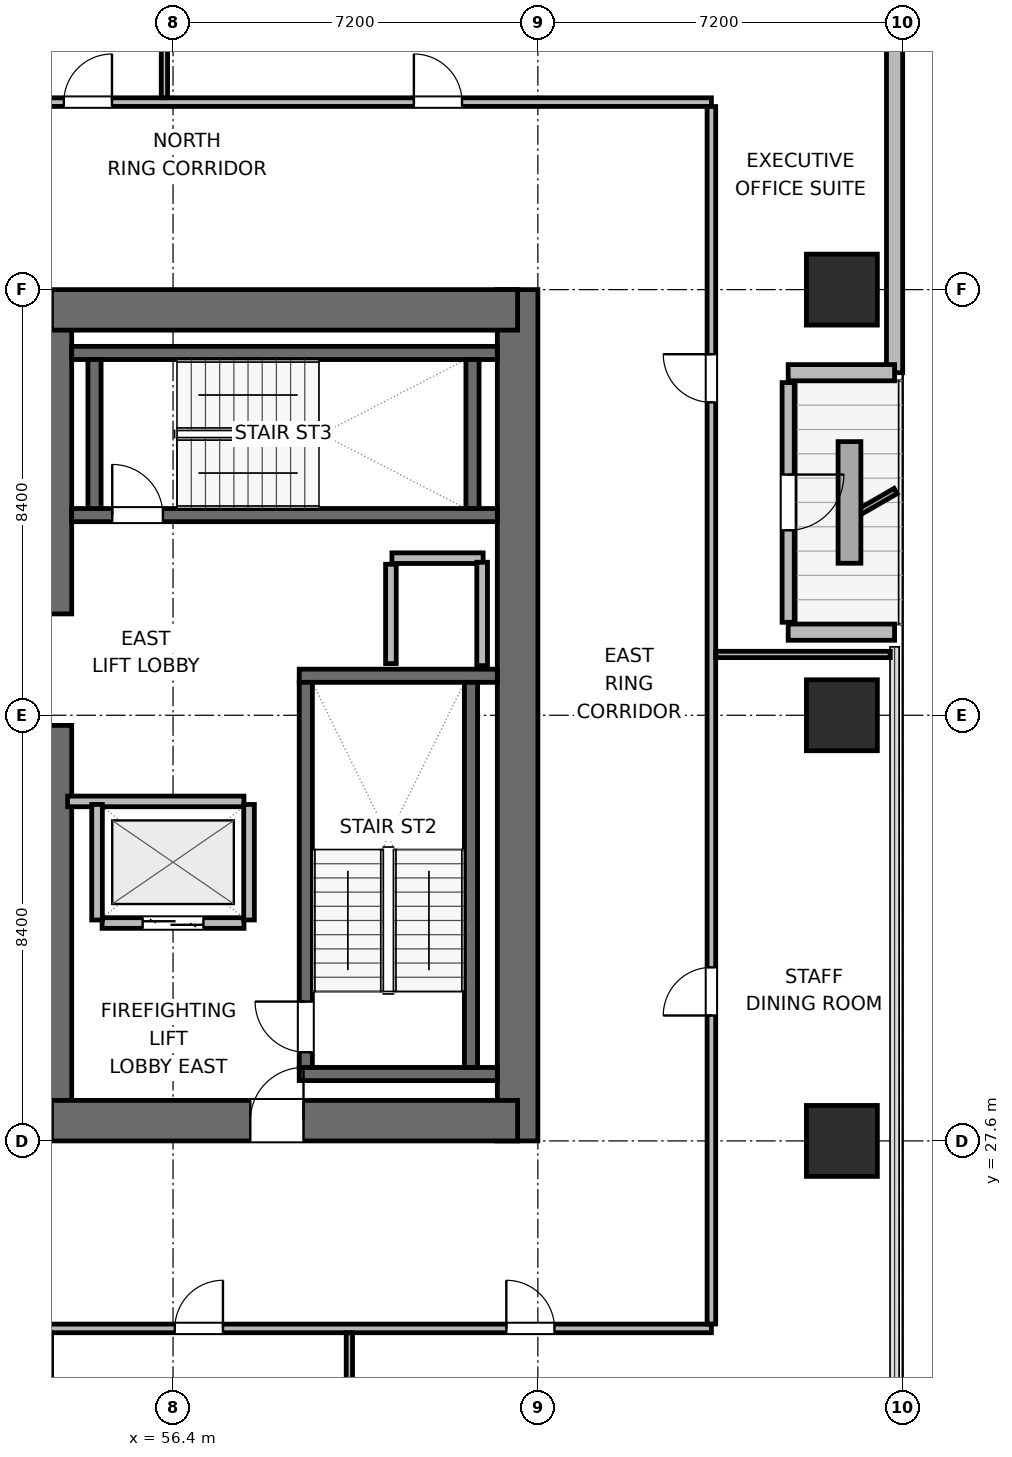
"""IFC4 building model, lengths in metres.
Left out: names, types, materials, properties, quantities, classifications, styles, units other than length and angle.
Written with IfcOpenShell. Run it as: python <this file> out.ifc"""

import sys

from ifc_helpers import new_model, si_unit, direction, frame, frame_2d, origin, origin_2d, place, context, subcontext, project, spatial, rectangle, extrude, element, fill, save


model = new_model("IFC4")
c1 = context("Model", 3, precision=1e-05, world=origin(), true_north=direction((0.0, 1.0)))
c2 = subcontext(c1, "Body", "Model", "MODEL_VIEW")
j1 = project(units=[si_unit("LENGTHUNIT", "METRE"), si_unit("PLANEANGLEUNIT", "RADIAN")], contexts=[c1])
p1 = place(None, origin())
s1 = spatial("IfcSite", under=j1, at=p1, CompositionType="ELEMENT")
p2 = place(p1, origin())
s2 = spatial("IfcBuilding", under=s1, at=p2, CompositionType="ELEMENT")
p3 = place(p2, frame((0.0, 0.0, 97.5)))
s3 = spatial("IfcBuildingStorey", under=s2, at=p3, CompositionType="ELEMENT", Elevation=97.5)
p4 = place(p3, frame((54.0, 28.0, 0.0), z_axis=(0.0, 0.0, 1.0), x_axis=(0.0, 1.0, 0.0)))
e1 = element("IfcWall", 1, at=p4, inside=s3, PredefinedType="SHEAR", context=c2, shape_type="SweptSolid", body=[
    extrude(rectangle(XDim=7.8, YDim=0.8, at=frame_2d((3.9, 0.0))), origin(), (0.0, 0.0, 1.0), 3.9),
])
p5 = place(p3, frame((54.0, 38.0, 0.0), z_axis=(0.0, 0.0, 1.0), x_axis=(0.0, 1.0, 0.0)))
e2 = element("IfcWall", 2, at=p5, inside=s3, PredefinedType="SHEAR", context=c2, shape_type="SweptSolid", body=[
    extrude(rectangle(XDim=6.0, YDim=0.8, at=frame_2d((3.0, 0.0))), origin(), (0.0, 0.0, 1.0), 3.9),
])
p6 = place(p3, frame((63.2, 27.6, 0.0), z_axis=(0.0, 0.0, 1.0), x_axis=(0.0, 1.0, 0.0)))
e3 = element("IfcWall", 3, at=p6, inside=s3, PredefinedType="SHEAR", context=c2, shape_type="SweptSolid", body=[
    extrude(rectangle(XDim=16.8, YDim=0.8, at=frame_2d((8.4, 0.0))), origin(), (0.0, 0.0, 1.0), 3.9),
])
p7 = place(p3, frame((54.0, 28.0, 0.0), z_axis=(0.0, 0.0, 1.0), x_axis=(1.0, 0.0, 0.0)))
e4 = element("IfcWall", 4, at=p7, inside=s3, PredefinedType="SHEAR", context=c2, shape_type="SweptSolid", body=[
    extrude(rectangle(XDim=9.2, YDim=0.8, at=frame_2d((4.6, 0.0))), origin(), (0.0, 0.0, 1.0), 3.9),
])
p8 = place(p7, frame((3.925, 0.0, 0.0)))
e5 = element("IfcOpeningElement", 5, at=p8, cuts=e4, PredefinedType="OPENING", context=c2, shape_type="SweptSolid", body=[
    extrude(rectangle(XDim=1.05, YDim=2.04, at=frame_2d((0.525, 1.02))), frame((0.0, 0.41, 0.0), z_axis=(0.0, -1.0, 0.0), x_axis=(1.0, 0.0, 0.0)), (0.0, 0.0, 1.0), 0.82),
])
p9 = place(p3, frame((54.0, 44.0, 0.0), z_axis=(0.0, 0.0, 1.0), x_axis=(1.0, 0.0, 0.0)))
e6 = element("IfcWall", 6, at=p9, inside=s3, PredefinedType="SHEAR", context=c2, shape_type="SweptSolid", body=[
    extrude(rectangle(XDim=9.2, YDim=0.8, at=frame_2d((4.6, 0.0))), origin(), (0.0, 0.0, 1.0), 3.9),
])
for number, where, z_axis, x_axis in (
    (7, (58.89, 28.92, 0.0), (0.0, 0.0, 1.0), (1.0, 0.0, 0.0)),
    (8, (58.89, 36.78, 0.0), (0.0, 0.0, 1.0), (1.0, 0.0, 0.0)),
):
    element("IfcWall", number, at=place(p3, frame(where, z_axis=z_axis, x_axis=x_axis)), inside=s3, PredefinedType="SHEAR", context=c2, shape_type="SweptSolid", body=[
        extrude(rectangle(XDim=3.91, YDim=0.26, at=frame_2d((1.955, 0.0))), origin(), (0.0, 0.0, 1.0), 3.9),
    ])
p10 = place(p3, frame((59.02, 29.05, 0.0), z_axis=(0.0, 0.0, 1.0), x_axis=(0.0, 1.0, 0.0)))
e9 = element("IfcWall", 9, at=p10, inside=s3, PredefinedType="SHEAR", context=c2, shape_type="SweptSolid", body=[
    extrude(rectangle(XDim=7.6, YDim=0.26, at=frame_2d((3.8, 0.0))), origin(), (0.0, 0.0, 1.0), 3.9),
])
p11 = place(p10, frame((0.3, 0.0, 0.0)))
e10 = element("IfcOpeningElement", 10, at=p11, cuts=e9, PredefinedType="OPENING", context=c2, shape_type="SweptSolid", body=[
    extrude(rectangle(XDim=1.0, YDim=2.04, at=frame_2d((0.5, 1.02))), frame((0.0, 0.14, 0.0), z_axis=(0.0, -1.0, 0.0), x_axis=(1.0, 0.0, 0.0)), (0.0, 0.0, 1.0), 0.28),
])
p12 = place(p3, frame((62.28, 29.05, 0.0), z_axis=(0.0, 0.0, 1.0), x_axis=(0.0, 1.0, 0.0)))
e11 = element("IfcWall", 11, at=p12, inside=s3, PredefinedType="SHEAR", context=c2, shape_type="SweptSolid", body=[
    extrude(rectangle(XDim=7.6, YDim=0.26, at=frame_2d((3.8, 0.0))), origin(), (0.0, 0.0, 1.0), 3.9),
])
p13 = place(p3, frame((54.4, 39.95, 0.0), z_axis=(0.0, 0.0, 1.0), x_axis=(1.0, 0.0, 0.0)))
e12 = element("IfcWall", 12, at=p13, inside=s3, PredefinedType="SHEAR", context=c2, shape_type="SweptSolid", body=[
    extrude(rectangle(XDim=8.4, YDim=0.26, at=frame_2d((4.2, 0.0))), origin(), (0.0, 0.0, 1.0), 3.9),
])
p14 = place(p13, frame((0.8, 0.0, 0.0)))
e13 = element("IfcOpeningElement", 13, at=p14, cuts=e12, PredefinedType="OPENING", context=c2, shape_type="SweptSolid", body=[
    extrude(rectangle(XDim=1.0, YDim=2.04, at=frame_2d((0.5, 1.02))), frame((0.0, 0.14, 0.0), z_axis=(0.0, -1.0, 0.0), x_axis=(1.0, 0.0, 0.0)), (0.0, 0.0, 1.0), 0.28),
])
p15 = place(p3, frame((54.4, 43.15, 0.0), z_axis=(0.0, 0.0, 1.0), x_axis=(1.0, 0.0, 0.0)))
e14 = element("IfcWall", 14, at=p15, inside=s3, PredefinedType="SHEAR", context=c2, shape_type="SweptSolid", body=[
    extrude(rectangle(XDim=8.4, YDim=0.26, at=frame_2d((4.2, 0.0))), origin(), (0.0, 0.0, 1.0), 3.9),
])
for number, where, z_axis, x_axis in (
    (15, (54.85, 40.08, 0.0), (0.0, 0.0, 1.0), (0.0, 1.0, 0.0)),
    (16, (62.31, 40.08, 0.0), (0.0, 0.0, 1.0), (0.0, 1.0, 0.0)),
):
    element("IfcWall", number, at=place(p3, frame(where, z_axis=z_axis, x_axis=x_axis)), inside=s3, PredefinedType="SHEAR", context=c2, shape_type="SweptSolid", body=[
        extrude(rectangle(XDim=2.94, YDim=0.26, at=frame_2d((1.47, 0.0))), origin(), (0.0, 0.0, 1.0), 3.9),
    ])
for number, where, z_axis, x_axis in (
    (17, (69.6, 27.6, 0.0), (0.0, 0.0, 1.0), (1.0, 0.0, 0.0)),
    (18, (69.6, 36.0, 0.0), (0.0, 0.0, 1.0), (1.0, 0.0, 0.0)),
    (19, (69.6, 44.4, 0.0), (0.0, 0.0, 1.0), (1.0, 0.0, 0.0)),
):
    element("IfcColumn", number, at=place(p3, frame(where, z_axis=z_axis, x_axis=x_axis)), inside=s3, PredefinedType="COLUMN", context=c2, shape_type="SweptSolid", body=[
        extrude(rectangle(XDim=1.4, YDim=1.4, at=origin_2d()), origin(), (0.0, 0.0, 1.0), 3.9),
    ])
p16 = place(p3, frame((70.64, 56.979, 0.0), z_axis=(0.0, 0.0, 1.0), x_axis=(0.0, -1.0, 0.0)))
e20 = element("IfcWall", 20, at=p16, inside=s3, PredefinedType="SOLIDWALL", context=c2, shape_type="SweptSolid", body=[
    extrude(rectangle(XDim=14.219, YDim=0.32, at=frame_2d((7.109, 0.0))), origin(), (0.0, 0.0, 1.0), 3.64),
])
p17 = place(p3, frame((70.64, 42.76, 0.0), z_axis=(0.0, 0.0, 1.0), x_axis=(-1.0, 0.0, 0.0)))
e21 = element("IfcWall", 21, at=p17, inside=s3, PredefinedType="SOLIDWALL", context=c2, shape_type="SweptSolid", body=[
    extrude(rectangle(XDim=2.1, YDim=0.32, at=frame_2d((1.05, 0.0))), origin(), (0.0, 0.0, 1.0), 2.875),
])
p18 = place(p3, frame((68.54, 42.565, 0.0), z_axis=(0.0, 0.0, 1.0), x_axis=(0.0, -1.0, 0.0)))
e22 = element("IfcWall", 22, at=p18, inside=s3, PredefinedType="SOLIDWALL", context=c2, shape_type="SweptSolid", body=[
    extrude(rectangle(XDim=4.73, YDim=0.24, at=frame_2d((2.365, 0.0))), origin(), (0.0, 0.0, 1.0), 3.162),
])
p19 = place(p18, frame((1.815, 0.0, 0.0)))
e23 = element("IfcOpeningElement", 23, at=p19, cuts=e22, PredefinedType="OPENING", context=c2, shape_type="SweptSolid", body=[
    extrude(rectangle(XDim=1.1, YDim=2.04, at=frame_2d((0.55, 1.02))), frame((0.0, 0.13, 0.0), z_axis=(0.0, -1.0, 0.0), x_axis=(1.0, 0.0, 0.0)), (0.0, 0.0, 1.0), 0.26),
])
p20 = place(p3, frame((68.54, 37.64, 0.0), z_axis=(0.0, 0.0, 1.0), x_axis=(1.0, 0.0, 0.0)))
e24 = element("IfcWall", 24, at=p20, inside=s3, PredefinedType="SOLIDWALL", context=c2, shape_type="SweptSolid", body=[
    extrude(rectangle(XDim=2.1, YDim=0.32, at=frame_2d((1.05, 0.0))), origin(), (0.0, 0.0, 1.0), 2.875),
])
p21 = place(p3, frame((60.72, 39.1, 0.0), z_axis=(0.0, 0.0, 1.0), x_axis=(1.0, 0.0, 0.0)))
e25 = element("IfcWall", 25, at=p21, inside=s3, PredefinedType="PARTITIONING", context=c2, shape_type="SweptSolid", body=[
    extrude(rectangle(XDim=1.8, YDim=0.21, at=frame_2d((0.9, 0.0))), origin(), (0.0, 0.0, 1.0), 3.64),
])
p22 = place(p3, frame((60.7, 37.02, 0.0), z_axis=(0.0, 0.0, 1.0), x_axis=(0.0, 1.0, 0.0)))
e26 = element("IfcWall", 26, at=p22, inside=s3, PredefinedType="PARTITIONING", context=c2, shape_type="SweptSolid", body=[
    extrude(rectangle(XDim=1.96, YDim=0.21, at=frame_2d((0.98, 0.0))), origin(), (0.0, 0.0, 1.0), 3.64),
])
p23 = place(p3, frame((62.5, 36.98, 0.0), z_axis=(0.0, 0.0, 1.0), x_axis=(0.0, 1.0, 0.0)))
e27 = element("IfcWall", 27, at=p23, inside=s3, PredefinedType="PARTITIONING", context=c2, shape_type="SweptSolid", body=[
    extrude(rectangle(XDim=2.04, YDim=0.21, at=frame_2d((1.02, 0.0))), origin(), (0.0, 0.0, 1.0), 3.64),
])
p24 = place(p3, frame((55.0, 31.9, 0.0), z_axis=(0.0, 0.0, 1.0), x_axis=(1.0, 0.0, 0.0)))
e28 = element("IfcWall", 28, at=p24, inside=s3, PredefinedType="PARTITIONING", context=c2, shape_type="SweptSolid", body=[
    extrude(rectangle(XDim=2.8, YDim=0.21, at=frame_2d((1.4, 0.0))), origin(), (0.0, 0.0, 1.0), 3.64),
])
p25 = place(p24, frame((0.8, 0.0, 0.0)))
e29 = element("IfcOpeningElement", 29, at=p25, cuts=e28, PredefinedType="OPENING", context=c2, shape_type="SweptSolid", body=[
    extrude(rectangle(XDim=1.2, YDim=2.04, at=frame_2d((0.6, 1.02))), frame((0.0, 0.115, 0.0), z_axis=(0.0, -1.0, 0.0), x_axis=(1.0, 0.0, 0.0)), (0.0, 0.0, 1.0), 0.23),
])
p26 = place(p3, frame((54.32, 34.3, 0.0), z_axis=(0.0, 0.0, 1.0), x_axis=(1.0, 0.0, 0.0)))
e30 = element("IfcWall", 30, at=p26, inside=s3, PredefinedType="PARTITIONING", context=c2, shape_type="SweptSolid", body=[
    extrude(rectangle(XDim=3.48, YDim=0.21, at=frame_2d((1.74, 0.0))), origin(), (0.0, 0.0, 1.0), 3.64),
])
for number, where, z_axis, x_axis in (
    (31, (54.9, 31.96, 0.0), (0.0, 0.0, 1.0), (0.0, 1.0, 0.0)),
    (32, (57.9, 31.96, 0.0), (0.0, 0.0, 1.0), (0.0, 1.0, 0.0)),
):
    element("IfcWall", number, at=place(p3, frame(where, z_axis=z_axis, x_axis=x_axis)), inside=s3, PredefinedType="PARTITIONING", context=c2, shape_type="SweptSolid", body=[
        extrude(rectangle(XDim=2.28, YDim=0.21, at=frame_2d((1.14, 0.0))), origin(), (0.0, 0.0, 1.0), 3.64),
    ])
p27 = place(p3, frame((28.975, 23.9, 0.0), z_axis=(0.0, 0.0, 1.0), x_axis=(1.0, 0.0, 0.0)))
e33 = element("IfcWall", 33, at=p27, inside=s3, PredefinedType="PARTITIONING", context=c2, shape_type="SweptSolid", body=[
    extrude(rectangle(XDim=38.05, YDim=0.17, at=frame_2d((19.025, 0.0))), origin(), (0.0, 0.0, 1.0), 3.64),
])
p28 = place(p27, frame((3.097, 0.0, 0.0)))
e34 = element("IfcOpeningElement", 34, at=p28, cuts=e33, PredefinedType="OPENING", context=c2, shape_type="SweptSolid", body=[
    extrude(rectangle(XDim=0.95, YDim=2.04, at=frame_2d((0.475, 1.02))), frame((0.0, 0.095, 0.0), z_axis=(0.0, -1.0, 0.0), x_axis=(1.0, 0.0, 0.0)), (0.0, 0.0, 1.0), 0.19),
])
p29 = place(p27, frame((9.64, 0.0, 0.0)))
e35 = element("IfcOpeningElement", 35, at=p29, cuts=e33, PredefinedType="OPENING", context=c2, shape_type="SweptSolid", body=[
    extrude(rectangle(XDim=0.95, YDim=2.04, at=frame_2d((0.475, 1.02))), frame((0.0, 0.095, 0.0), z_axis=(0.0, -1.0, 0.0), x_axis=(1.0, 0.0, 0.0)), (0.0, 0.0, 1.0), 0.19),
])
p30 = place(p27, frame((15.58, 0.0, 0.0)))
e36 = element("IfcOpeningElement", 36, at=p30, cuts=e33, PredefinedType="OPENING", context=c2, shape_type="SweptSolid", body=[
    extrude(rectangle(XDim=0.95, YDim=2.04, at=frame_2d((0.475, 1.02))), frame((0.0, 0.095, 0.0), z_axis=(0.0, -1.0, 0.0), x_axis=(1.0, 0.0, 0.0)), (0.0, 0.0, 1.0), 0.19),
])
p31 = place(p27, frame((21.52, 0.0, 0.0)))
e37 = element("IfcOpeningElement", 37, at=p31, cuts=e33, PredefinedType="OPENING", context=c2, shape_type="SweptSolid", body=[
    extrude(rectangle(XDim=0.95, YDim=2.04, at=frame_2d((0.475, 1.02))), frame((0.0, 0.095, 0.0), z_axis=(0.0, -1.0, 0.0), x_axis=(1.0, 0.0, 0.0)), (0.0, 0.0, 1.0), 0.19),
])
p32 = place(p27, frame((27.46, 0.0, 0.0)))
e38 = element("IfcOpeningElement", 38, at=p32, cuts=e33, PredefinedType="OPENING", context=c2, shape_type="SweptSolid", body=[
    extrude(rectangle(XDim=0.95, YDim=2.04, at=frame_2d((0.475, 1.02))), frame((0.0, 0.095, 0.0), z_axis=(0.0, -1.0, 0.0), x_axis=(1.0, 0.0, 0.0)), (0.0, 0.0, 1.0), 0.19),
])
p33 = place(p27, frame((34.003, 0.0, 0.0)))
e39 = element("IfcOpeningElement", 39, at=p33, cuts=e33, PredefinedType="OPENING", context=c2, shape_type="SweptSolid", body=[
    extrude(rectangle(XDim=0.95, YDim=2.04, at=frame_2d((0.475, 1.02))), frame((0.0, 0.095, 0.0), z_axis=(0.0, -1.0, 0.0), x_axis=(1.0, 0.0, 0.0)), (0.0, 0.0, 1.0), 0.19),
])
p34 = place(p3, frame((28.975, 48.1, 0.0), z_axis=(0.0, 0.0, 1.0), x_axis=(1.0, 0.0, 0.0)))
e40 = element("IfcWall", 40, at=p34, inside=s3, PredefinedType="PARTITIONING", context=c2, shape_type="SweptSolid", body=[
    extrude(rectangle(XDim=38.05, YDim=0.17, at=frame_2d((19.025, 0.0))), origin(), (0.0, 0.0, 1.0), 3.64),
])
p35 = place(p34, frame((4.923, 0.0, 0.0)))
e41 = element("IfcOpeningElement", 41, at=p35, cuts=e40, PredefinedType="OPENING", context=c2, shape_type="SweptSolid", body=[
    extrude(rectangle(XDim=0.95, YDim=2.04, at=frame_2d((0.475, 1.02))), frame((0.0, 0.095, 0.0), z_axis=(0.0, -1.0, 0.0), x_axis=(1.0, 0.0, 0.0)), (0.0, 0.0, 1.0), 0.19),
])
p36 = place(p34, frame((13.34, 0.0, 0.0)))
e42 = element("IfcOpeningElement", 42, at=p36, cuts=e40, PredefinedType="OPENING", context=c2, shape_type="SweptSolid", body=[
    extrude(rectangle(XDim=0.95, YDim=2.04, at=frame_2d((0.475, 1.02))), frame((0.0, 0.095, 0.0), z_axis=(0.0, -1.0, 0.0), x_axis=(1.0, 0.0, 0.0)), (0.0, 0.0, 1.0), 0.19),
])
p37 = place(p34, frame((20.06, 0.0, 0.0)))
e43 = element("IfcOpeningElement", 43, at=p37, cuts=e40, PredefinedType="OPENING", context=c2, shape_type="SweptSolid", body=[
    extrude(rectangle(XDim=0.95, YDim=2.04, at=frame_2d((0.475, 1.02))), frame((0.0, 0.095, 0.0), z_axis=(0.0, -1.0, 0.0), x_axis=(1.0, 0.0, 0.0)), (0.0, 0.0, 1.0), 0.19),
])
p38 = place(p34, frame((25.27, 0.0, 0.0)))
e44 = element("IfcOpeningElement", 44, at=p38, cuts=e40, PredefinedType="OPENING", context=c2, shape_type="SweptSolid", body=[
    extrude(rectangle(XDim=0.95, YDim=2.04, at=frame_2d((0.475, 1.02))), frame((0.0, 0.095, 0.0), z_axis=(0.0, -1.0, 0.0), x_axis=(1.0, 0.0, 0.0)), (0.0, 0.0, 1.0), 0.19),
])
p39 = place(p34, frame((32.178, 0.0, 0.0)))
e45 = element("IfcOpeningElement", 45, at=p39, cuts=e40, PredefinedType="OPENING", context=c2, shape_type="SweptSolid", body=[
    extrude(rectangle(XDim=0.95, YDim=2.04, at=frame_2d((0.475, 1.02))), frame((0.0, 0.095, 0.0), z_axis=(0.0, -1.0, 0.0), x_axis=(1.0, 0.0, 0.0)), (0.0, 0.0, 1.0), 0.19),
])
p40 = place(p3, frame((67.025, 23.987, 0.0), z_axis=(0.0, 0.0, 1.0), x_axis=(0.0, 1.0, 0.0)))
e46 = element("IfcWall", 46, at=p40, inside=s3, PredefinedType="PARTITIONING", context=c2, shape_type="SweptSolid", body=[
    extrude(rectangle(XDim=24.026, YDim=0.17, at=frame_2d((12.013, 0.0))), origin(), (0.0, 0.0, 1.0), 3.64),
])
p41 = place(p40, frame((6.088, 0.0, 0.0)))
e47 = element("IfcOpeningElement", 47, at=p41, cuts=e46, PredefinedType="OPENING", context=c2, shape_type="SweptSolid", body=[
    extrude(rectangle(XDim=0.95, YDim=2.04, at=frame_2d((0.475, 1.02))), frame((0.0, 0.095, 0.0), z_axis=(0.0, -1.0, 0.0), x_axis=(1.0, 0.0, 0.0)), (0.0, 0.0, 1.0), 0.19),
])
p42 = place(p40, frame((18.188, 0.0, 0.0)))
e48 = element("IfcOpeningElement", 48, at=p42, cuts=e46, PredefinedType="OPENING", context=c2, shape_type="SweptSolid", body=[
    extrude(rectangle(XDim=0.95, YDim=2.04, at=frame_2d((0.475, 1.02))), frame((0.0, 0.095, 0.0), z_axis=(0.0, -1.0, 0.0), x_axis=(1.0, 0.0, 0.0)), (0.0, 0.0, 1.0), 0.19),
])
p43 = place(p3, frame((59.88, 9.915, 0.0), z_axis=(0.0, 0.0, 1.0), x_axis=(0.0, 1.0, 0.0)))
e49 = element("IfcWall", 49, at=p43, inside=s3, PredefinedType="PARTITIONING", context=c2, shape_type="SweptSolid", body=[
    extrude(rectangle(XDim=13.898, YDim=0.125, at=frame_2d((6.949, 0.0))), origin(), (0.0, 0.0, 1.0), 3.64),
])
p44 = place(p3, frame((56.23, 48.187, 0.0), z_axis=(0.0, 0.0, 1.0), x_axis=(0.0, 1.0, 0.0)))
e50 = element("IfcWall", 50, at=p44, inside=s3, PredefinedType="PARTITIONING", context=c2, shape_type="SweptSolid", body=[
    extrude(rectangle(XDim=13.898, YDim=0.125, at=frame_2d((6.949, 0.0))), origin(), (0.0, 0.0, 1.0), 3.003),
])
p45 = place(p3, frame((67.112, 37.2, 0.0), z_axis=(0.0, 0.0, 1.0), x_axis=(1.0, 0.0, 0.0)))
e51 = element("IfcWall", 51, at=p45, inside=s3, PredefinedType="PARTITIONING", context=c2, shape_type="SweptSolid", body=[
    extrude(rectangle(XDim=3.443, YDim=0.125, at=frame_2d((1.721, 0.0))), origin(), (0.0, 0.0, 1.0), 3.64),
])
p46 = place(p19, origin())
e52 = element("IfcDoor", 52, at=p46, inside=s3, OperationType="SINGLE_SWING_LEFT", PredefinedType="DOOR", context=c2, shape_type="SweptSolid", body=[
    extrude(rectangle(XDim=1.1, YDim=2.04, at=frame_2d((0.55, 1.02))), frame((0.0, 0.025, 0.0), z_axis=(0.0, -1.0, 0.0), x_axis=(1.0, 0.0, 0.0)), (0.0, 0.0, 1.0), 0.05),
])
fill(e23, e52)
p47 = place(p11, origin())
e53 = element("IfcDoor", 53, at=p47, inside=s3, OperationType="SINGLE_SWING_RIGHT", PredefinedType="DOOR", context=c2, shape_type="SweptSolid", body=[
    extrude(rectangle(XDim=1.0, YDim=2.04, at=frame_2d((0.5, 1.02))), frame((0.0, 0.025, 0.0), z_axis=(0.0, -1.0, 0.0), x_axis=(1.0, 0.0, 0.0)), (0.0, 0.0, 1.0), 0.05),
])
fill(e10, e53)
p48 = place(p14, origin())
e54 = element("IfcDoor", 54, at=p48, inside=s3, OperationType="SINGLE_SWING_LEFT", PredefinedType="DOOR", context=c2, shape_type="SweptSolid", body=[
    extrude(rectangle(XDim=1.0, YDim=2.04, at=frame_2d((0.5, 1.02))), frame((0.0, 0.025, 0.0), z_axis=(0.0, -1.0, 0.0), x_axis=(1.0, 0.0, 0.0)), (0.0, 0.0, 1.0), 0.05),
])
fill(e13, e54)
p49 = place(p25, origin())
e55 = element("IfcDoor", 55, at=p49, inside=s3, OperationType="DOUBLE_DOOR_SLIDING", PredefinedType="DOOR", context=c2, shape_type="SweptSolid", body=[
    extrude(rectangle(XDim=1.2, YDim=2.04, at=frame_2d((0.6, 1.02))), frame((0.0, 0.025, 0.0), z_axis=(0.0, -1.0, 0.0), x_axis=(1.0, 0.0, 0.0)), (0.0, 0.0, 1.0), 0.05),
])
fill(e29, e55)
p50 = place(p8, origin())
e56 = element("IfcDoor", 56, at=p50, inside=s3, OperationType="SINGLE_SWING_RIGHT", PredefinedType="DOOR", context=c2, shape_type="SweptSolid", body=[
    extrude(rectangle(XDim=1.05, YDim=2.04, at=frame_2d((0.525, 1.02))), frame((0.0, 0.025, 0.0), z_axis=(0.0, -1.0, 0.0), x_axis=(1.0, 0.0, 0.0)), (0.0, 0.0, 1.0), 0.05),
])
fill(e5, e56)
p51 = place(p32, origin())
e57 = element("IfcDoor", 57, at=p51, inside=s3, OperationType="SINGLE_SWING_RIGHT", PredefinedType="DOOR", context=c2, shape_type="SweptSolid", body=[
    extrude(rectangle(XDim=0.95, YDim=2.04, at=frame_2d((0.475, 1.02))), frame((0.0, 0.025, 0.0), z_axis=(0.0, -1.0, 0.0), x_axis=(1.0, 0.0, 0.0)), (0.0, 0.0, 1.0), 0.05),
])
fill(e38, e57)
p52 = place(p33, origin())
e58 = element("IfcDoor", 58, at=p52, inside=s3, OperationType="SINGLE_SWING_LEFT", PredefinedType="DOOR", context=c2, shape_type="SweptSolid", body=[
    extrude(rectangle(XDim=0.95, YDim=2.04, at=frame_2d((0.475, 1.02))), frame((0.0, 0.025, 0.0), z_axis=(0.0, -1.0, 0.0), x_axis=(1.0, 0.0, 0.0)), (0.0, 0.0, 1.0), 0.05),
])
fill(e39, e58)
p53 = place(p38, origin())
e59 = element("IfcDoor", 59, at=p53, inside=s3, OperationType="SINGLE_SWING_RIGHT", PredefinedType="DOOR", context=c2, shape_type="SweptSolid", body=[
    extrude(rectangle(XDim=0.95, YDim=2.04, at=frame_2d((0.475, 1.02))), frame((0.0, 0.025, 0.0), z_axis=(0.0, -1.0, 0.0), x_axis=(1.0, 0.0, 0.0)), (0.0, 0.0, 1.0), 0.05),
])
fill(e44, e59)
p54 = place(p39, origin())
e60 = element("IfcDoor", 60, at=p54, inside=s3, OperationType="SINGLE_SWING_LEFT", PredefinedType="DOOR", context=c2, shape_type="SweptSolid", body=[
    extrude(rectangle(XDim=0.95, YDim=2.04, at=frame_2d((0.475, 1.02))), frame((0.0, 0.025, 0.0), z_axis=(0.0, -1.0, 0.0), x_axis=(1.0, 0.0, 0.0)), (0.0, 0.0, 1.0), 0.05),
])
fill(e45, e60)
p55 = place(p41, origin())
e61 = element("IfcDoor", 61, at=p55, inside=s3, OperationType="SINGLE_SWING_LEFT", PredefinedType="DOOR", context=c2, shape_type="SweptSolid", body=[
    extrude(rectangle(XDim=0.95, YDim=2.04, at=frame_2d((0.475, 1.02))), frame((0.0, 0.025, 0.0), z_axis=(0.0, -1.0, 0.0), x_axis=(1.0, 0.0, 0.0)), (0.0, 0.0, 1.0), 0.05),
])
fill(e47, e61)
p56 = place(p42, origin())
e62 = element("IfcDoor", 62, at=p56, inside=s3, OperationType="SINGLE_SWING_RIGHT", PredefinedType="DOOR", context=c2, shape_type="SweptSolid", body=[
    extrude(rectangle(XDim=0.95, YDim=2.04, at=frame_2d((0.475, 1.02))), frame((0.0, 0.025, 0.0), z_axis=(0.0, -1.0, 0.0), x_axis=(1.0, 0.0, 0.0)), (0.0, 0.0, 1.0), 0.05),
])
fill(e48, e62)
save(model, sys.argv[1])
